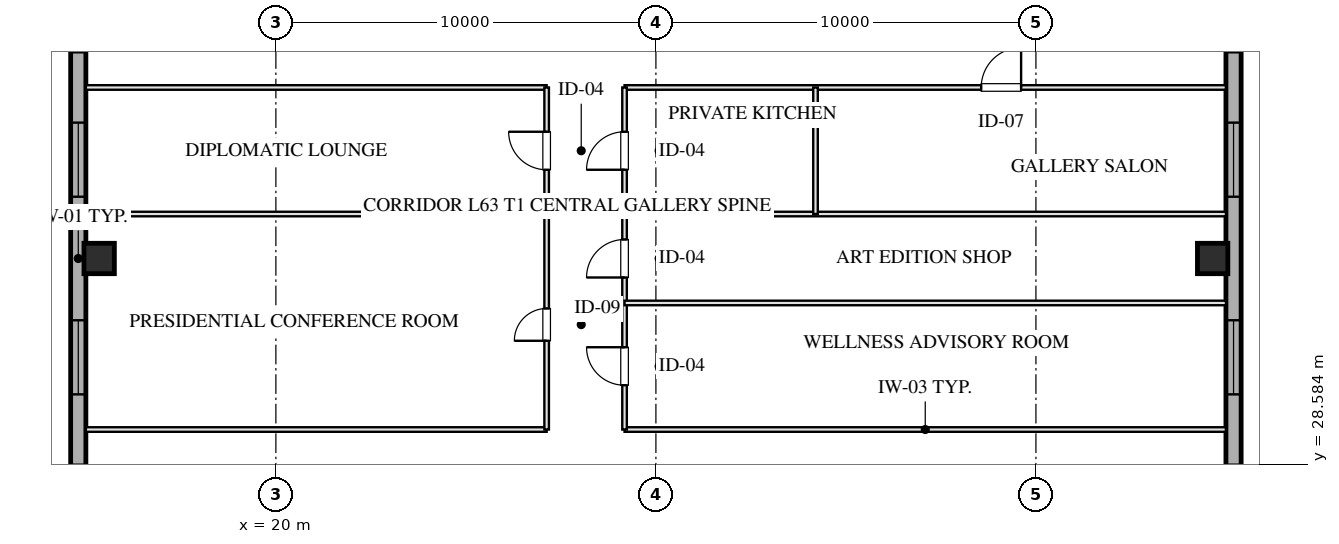
"""IFC4 building model, lengths in metres.
Left out: names, types, materials, properties, quantities, classifications, styles, units other than length and angle.
Written with IfcOpenShell. Run it as: python <this file> out.ifc"""

import sys

from ifc_helpers import new_model, si_unit, direction, frame, frame_2d, origin, origin_2d, place, context, subcontext, project, spatial, rectangle, hollow_rectangle, extrude, element, fill, save


model = new_model("IFC4")
c1 = context("Model", 3, precision=1e-05, world=origin(), true_north=direction((0.0, 1.0)))
c2 = subcontext(c1, "Body", "Model", "MODEL_VIEW")
j1 = project(units=[si_unit("LENGTHUNIT", "METRE"), si_unit("PLANEANGLEUNIT", "RADIAN")], contexts=[c1])
p1 = place(None, origin())
s1 = spatial("IfcSite", under=j1, at=p1, CompositionType="ELEMENT")
p2 = place(p1, origin())
s2 = spatial("IfcBuilding", under=s1, at=p2, CompositionType="ELEMENT")
p3 = place(p2, frame((0.0, 0.0, 234.4)))
s3 = spatial("IfcBuildingStorey", under=s2, at=p3, CompositionType="ELEMENT", Elevation=234.4)
for number, where, z_axis, x_axis in (
    (1, (15.35, 34.0, 0.0), (0.0, 0.0, 1.0), (1.0, 0.0, 0.0)),
    (2, (44.65, 34.0, 0.0), (0.0, 0.0, 1.0), (1.0, 0.0, 0.0)),
):
    element("IfcColumn", number, at=place(p3, frame(where, z_axis=z_axis, x_axis=x_axis)), inside=s3, PredefinedType="COLUMN", context=c2, shape_type="SweptSolid", body=[
        extrude(hollow_rectangle(XDim=0.8, YDim=0.8, WallThickness=0.028, at=origin_2d()), origin(), (0.0, 0.0, 1.0), 3.201),
    ])
p4 = place(p3, frame((14.8, 13.1, 0.0), z_axis=(0.0, 0.0, 1.0), x_axis=(0.0, 1.0, 0.0)))
e3 = element("IfcWall", 3, at=p4, inside=s3, PredefinedType="SOLIDWALL", context=c2, shape_type="SweptSolid", body=[
    extrude(rectangle(XDim=41.8, YDim=0.4, at=frame_2d((20.9, 0.0))), origin(), (0.0, 0.0, 1.0), 2.36),
])
p5 = place(p4, frame((13.525, 0.0, 0.75)))
e4 = element("IfcOpeningElement", 4, at=p5, cuts=e3, PredefinedType="OPENING", context=c2, shape_type="SweptSolid", body=[
    extrude(rectangle(XDim=1.95, YDim=1.21, at=frame_2d((0.975, 0.605))), frame((0.0, 0.21, 0.0), z_axis=(0.0, -1.0, 0.0), x_axis=(1.0, 0.0, 0.0)), (0.0, 0.0, 1.0), 0.42),
])
p6 = place(p4, frame((17.325, 0.0, 0.75)))
e5 = element("IfcOpeningElement", 5, at=p6, cuts=e3, PredefinedType="OPENING", context=c2, shape_type="SweptSolid", body=[
    extrude(rectangle(XDim=1.95, YDim=1.21, at=frame_2d((0.975, 0.605))), frame((0.0, 0.21, 0.0), z_axis=(0.0, -1.0, 0.0), x_axis=(1.0, 0.0, 0.0)), (0.0, 0.0, 1.0), 0.42),
])
p7 = place(p4, frame((22.525, 0.0, 0.75)))
e6 = element("IfcOpeningElement", 6, at=p7, cuts=e3, PredefinedType="OPENING", context=c2, shape_type="SweptSolid", body=[
    extrude(rectangle(XDim=1.95, YDim=1.21, at=frame_2d((0.975, 0.605))), frame((0.0, 0.21, 0.0), z_axis=(0.0, -1.0, 0.0), x_axis=(1.0, 0.0, 0.0)), (0.0, 0.0, 1.0), 0.42),
])
p8 = place(p4, frame((26.325, 0.0, 0.75)))
e7 = element("IfcOpeningElement", 7, at=p8, cuts=e3, PredefinedType="OPENING", context=c2, shape_type="SweptSolid", body=[
    extrude(rectangle(XDim=1.95, YDim=1.21, at=frame_2d((0.975, 0.605))), frame((0.0, 0.21, 0.0), z_axis=(0.0, -1.0, 0.0), x_axis=(1.0, 0.0, 0.0)), (0.0, 0.0, 1.0), 0.42),
])
p9 = place(p3, frame((45.2, 54.9, 0.0), z_axis=(0.0, 0.0, 1.0), x_axis=(0.0, -1.0, 0.0)))
e8 = element("IfcWall", 8, at=p9, inside=s3, PredefinedType="SOLIDWALL", context=c2, shape_type="SweptSolid", body=[
    extrude(rectangle(XDim=41.8, YDim=0.4, at=frame_2d((20.9, 0.0))), origin(), (0.0, 0.0, 1.0), 2.36),
])
p10 = place(p9, frame((26.325, 0.0, 0.75)))
e9 = element("IfcOpeningElement", 9, at=p10, cuts=e8, PredefinedType="OPENING", context=c2, shape_type="SweptSolid", body=[
    extrude(rectangle(XDim=1.95, YDim=1.21, at=frame_2d((0.975, 0.605))), frame((0.0, 0.21, 0.0), z_axis=(0.0, -1.0, 0.0), x_axis=(1.0, 0.0, 0.0)), (0.0, 0.0, 1.0), 0.42),
])
p11 = place(p9, frame((22.525, 0.0, 0.75)))
e10 = element("IfcOpeningElement", 10, at=p11, cuts=e8, PredefinedType="OPENING", context=c2, shape_type="SweptSolid", body=[
    extrude(rectangle(XDim=1.95, YDim=1.21, at=frame_2d((0.975, 0.605))), frame((0.0, 0.21, 0.0), z_axis=(0.0, -1.0, 0.0), x_axis=(1.0, 0.0, 0.0)), (0.0, 0.0, 1.0), 0.42),
])
p12 = place(p9, frame((17.325, 0.0, 0.75)))
e11 = element("IfcOpeningElement", 11, at=p12, cuts=e8, PredefinedType="OPENING", context=c2, shape_type="SweptSolid", body=[
    extrude(rectangle(XDim=1.95, YDim=1.21, at=frame_2d((0.975, 0.605))), frame((0.0, 0.21, 0.0), z_axis=(0.0, -1.0, 0.0), x_axis=(1.0, 0.0, 0.0)), (0.0, 0.0, 1.0), 0.42),
])
p13 = place(p9, frame((13.525, 0.0, 0.75)))
e12 = element("IfcOpeningElement", 12, at=p13, cuts=e8, PredefinedType="OPENING", context=c2, shape_type="SweptSolid", body=[
    extrude(rectangle(XDim=1.95, YDim=1.21, at=frame_2d((0.975, 0.605))), frame((0.0, 0.21, 0.0), z_axis=(0.0, -1.0, 0.0), x_axis=(1.0, 0.0, 0.0)), (0.0, 0.0, 1.0), 0.42),
])
p14 = place(p3, frame((15.0, 29.5, 0.0), z_axis=(0.0, 0.0, 1.0), x_axis=(1.0, 0.0, 0.0)))
e13 = element("IfcWall", 13, at=p14, inside=s3, PredefinedType="PARTITIONING", context=c2, shape_type="SweptSolid", body=[
    extrude(rectangle(XDim=12.125, YDim=0.12, at=frame_2d((6.062, 0.0))), origin(), (0.0, 0.0, 1.0), 2.925),
])
p15 = place(p3, frame((29.175, 29.5, 0.0), z_axis=(0.0, 0.0, 1.0), x_axis=(1.0, 0.0, 0.0)))
e14 = element("IfcWall", 14, at=p15, inside=s3, PredefinedType="PARTITIONING", context=c2, shape_type="SweptSolid", body=[
    extrude(rectangle(XDim=15.825, YDim=0.12, at=frame_2d((7.913, 0.0))), origin(), (0.0, 0.0, 1.0), 2.925),
])
p16 = place(p3, frame((15.0, 38.5, 0.0), z_axis=(0.0, 0.0, 1.0), x_axis=(1.0, 0.0, 0.0)))
e15 = element("IfcWall", 15, at=p16, inside=s3, PredefinedType="PARTITIONING", context=c2, shape_type="SweptSolid", body=[
    extrude(rectangle(XDim=12.125, YDim=0.12, at=frame_2d((6.062, 0.0))), origin(), (0.0, 0.0, 1.0), 2.925),
])
p17 = place(p3, frame((29.175, 38.5, 0.0), z_axis=(0.0, 0.0, 1.0), x_axis=(1.0, 0.0, 0.0)))
e16 = element("IfcWall", 16, at=p17, inside=s3, PredefinedType="PARTITIONING", context=c2, shape_type="SweptSolid", body=[
    extrude(rectangle(XDim=15.825, YDim=0.12, at=frame_2d((7.913, 0.0))), origin(), (0.0, 0.0, 1.0), 2.925),
])
p18 = place(p17, frame((9.385, 0.0, 0.0)))
e17 = element("IfcOpeningElement", 17, at=p18, cuts=e16, PredefinedType="OPENING", context=c2, shape_type="SweptSolid", body=[
    extrude(rectangle(XDim=1.05, YDim=2.05, at=frame_2d((0.525, 1.025))), frame((0.0, 0.07, 0.0), z_axis=(0.0, -1.0, 0.0), x_axis=(1.0, 0.0, 0.0)), (0.0, 0.0, 1.0), 0.14),
])
p19 = place(p3, frame((27.125, 29.5, 0.0), z_axis=(0.0, 0.0, 1.0), x_axis=(0.0, 1.0, 0.0)))
e18 = element("IfcWall", 18, at=p19, inside=s3, PredefinedType="PARTITIONING", context=c2, shape_type="SweptSolid", body=[
    extrude(rectangle(XDim=9.0, YDim=0.12, at=frame_2d((4.5, 0.0))), origin(), (0.0, 0.0, 1.0), 2.925),
])
p20 = place(p19, frame((2.335, 0.0, 0.0)))
e19 = element("IfcOpeningElement", 19, at=p20, cuts=e18, PredefinedType="OPENING", context=c2, shape_type="SweptSolid", body=[
    extrude(rectangle(XDim=0.85, YDim=2.05, at=frame_2d((0.425, 1.025))), frame((0.0, 0.07, 0.0), z_axis=(0.0, -1.0, 0.0), x_axis=(1.0, 0.0, 0.0)), (0.0, 0.0, 1.0), 0.14),
])
p21 = place(p19, frame((6.835, 0.0, 0.0)))
e20 = element("IfcOpeningElement", 20, at=p21, cuts=e18, PredefinedType="OPENING", context=c2, shape_type="SweptSolid", body=[
    extrude(rectangle(XDim=1.0, YDim=2.05, at=frame_2d((0.5, 1.025))), frame((0.0, 0.07, 0.0), z_axis=(0.0, -1.0, 0.0), x_axis=(1.0, 0.0, 0.0)), (0.0, 0.0, 1.0), 0.14),
])
p22 = place(p3, frame((29.175, 29.5, 0.0), z_axis=(0.0, 0.0, 1.0), x_axis=(0.0, 1.0, 0.0)))
e21 = element("IfcWall", 21, at=p22, inside=s3, PredefinedType="PARTITIONING", context=c2, shape_type="SweptSolid", body=[
    extrude(rectangle(XDim=9.0, YDim=0.12, at=frame_2d((4.5, 0.0))), origin(), (0.0, 0.0, 1.0), 2.925),
])
p23 = place(p22, frame((1.165, 0.0, 0.0)))
e22 = element("IfcOpeningElement", 22, at=p23, cuts=e21, PredefinedType="OPENING", context=c2, shape_type="SweptSolid", body=[
    extrude(rectangle(XDim=1.0, YDim=2.05, at=frame_2d((0.5, 1.025))), frame((0.0, 0.07, 0.0), z_axis=(0.0, -1.0, 0.0), x_axis=(1.0, 0.0, 0.0)), (0.0, 0.0, 1.0), 0.14),
])
p24 = place(p22, frame((4.0, 0.0, 0.0)))
e23 = element("IfcOpeningElement", 23, at=p24, cuts=e21, PredefinedType="OPENING", context=c2, shape_type="SweptSolid", body=[
    extrude(rectangle(XDim=1.0, YDim=2.05, at=frame_2d((0.5, 1.025))), frame((0.0, 0.07, 0.0), z_axis=(0.0, -1.0, 0.0), x_axis=(1.0, 0.0, 0.0)), (0.0, 0.0, 1.0), 0.14),
])
p25 = place(p22, frame((6.835, 0.0, 0.0)))
e24 = element("IfcOpeningElement", 24, at=p25, cuts=e21, PredefinedType="OPENING", context=c2, shape_type="SweptSolid", body=[
    extrude(rectangle(XDim=1.0, YDim=2.05, at=frame_2d((0.5, 1.025))), frame((0.0, 0.07, 0.0), z_axis=(0.0, -1.0, 0.0), x_axis=(1.0, 0.0, 0.0)), (0.0, 0.0, 1.0), 0.14),
])
p26 = place(p3, frame((15.0, 35.17, 0.0), z_axis=(0.0, 0.0, 1.0), x_axis=(1.0, 0.0, 0.0)))
e25 = element("IfcWall", 25, at=p26, inside=s3, PredefinedType="PARTITIONING", context=c2, shape_type="SweptSolid", body=[
    extrude(rectangle(XDim=12.125, YDim=0.12, at=frame_2d((6.062, 0.0))), origin(), (0.0, 0.0, 1.0), 2.925),
])
for number, where, z_axis, x_axis in (
    (26, (29.175, 32.83, 0.0), (0.0, 0.0, 1.0), (1.0, 0.0, 0.0)),
    (27, (29.175, 35.17, 0.0), (0.0, 0.0, 1.0), (1.0, 0.0, 0.0)),
):
    element("IfcWall", number, at=place(p3, frame(where, z_axis=z_axis, x_axis=x_axis)), inside=s3, PredefinedType="PARTITIONING", context=c2, shape_type="SweptSolid", body=[
        extrude(rectangle(XDim=15.825, YDim=0.12, at=frame_2d((7.913, 0.0))), origin(), (0.0, 0.0, 1.0), 2.925),
    ])
p27 = place(p3, frame((34.2, 35.17, 0.0), z_axis=(0.0, 0.0, 1.0), x_axis=(0.0, 1.0, 0.0)))
e28 = element("IfcWall", 28, at=p27, inside=s3, PredefinedType="PARTITIONING", context=c2, shape_type="SweptSolid", body=[
    extrude(rectangle(XDim=3.33, YDim=0.12, at=frame_2d((1.665, 0.0))), origin(), (0.0, 0.0, 1.0), 2.925),
])
p28 = place(p6, origin())
e29 = element("IfcWindow", 29, at=p28, inside=s3, PartitioningType="TRIPLE_PANEL_VERTICAL", PredefinedType="WINDOW", context=c2, shape_type="SweptSolid", body=[
    extrude(rectangle(XDim=1.95, YDim=1.21, at=frame_2d((0.975, 0.605))), frame((0.0, 0.03, 0.0), z_axis=(0.0, -1.0, 0.0), x_axis=(1.0, 0.0, 0.0)), (0.0, 0.0, 1.0), 0.06),
])
fill(e5, e29)
p29 = place(p7, origin())
e30 = element("IfcWindow", 30, at=p29, inside=s3, PartitioningType="TRIPLE_PANEL_VERTICAL", PredefinedType="WINDOW", context=c2, shape_type="SweptSolid", body=[
    extrude(rectangle(XDim=1.95, YDim=1.21, at=frame_2d((0.975, 0.605))), frame((0.0, 0.03, 0.0), z_axis=(0.0, -1.0, 0.0), x_axis=(1.0, 0.0, 0.0)), (0.0, 0.0, 1.0), 0.06),
])
fill(e6, e30)
p30 = place(p11, origin())
e31 = element("IfcWindow", 31, at=p30, inside=s3, PartitioningType="TRIPLE_PANEL_VERTICAL", PredefinedType="WINDOW", context=c2, shape_type="SweptSolid", body=[
    extrude(rectangle(XDim=1.95, YDim=1.21, at=frame_2d((0.975, 0.605))), frame((0.0, 0.03, 0.0), z_axis=(0.0, -1.0, 0.0), x_axis=(1.0, 0.0, 0.0)), (0.0, 0.0, 1.0), 0.06),
])
fill(e10, e31)
p31 = place(p12, origin())
e32 = element("IfcWindow", 32, at=p31, inside=s3, PartitioningType="TRIPLE_PANEL_VERTICAL", PredefinedType="WINDOW", context=c2, shape_type="SweptSolid", body=[
    extrude(rectangle(XDim=1.95, YDim=1.21, at=frame_2d((0.975, 0.605))), frame((0.0, 0.03, 0.0), z_axis=(0.0, -1.0, 0.0), x_axis=(1.0, 0.0, 0.0)), (0.0, 0.0, 1.0), 0.06),
])
fill(e11, e32)
p32 = place(p18, origin())
e33 = element("IfcDoor", 33, at=p32, inside=s3, OperationType="SINGLE_SWING_RIGHT", PredefinedType="DOOR", context=c2, shape_type="SweptSolid", body=[
    extrude(rectangle(XDim=1.05, YDim=2.05, at=frame_2d((0.525, 1.025))), frame((0.0, 0.025, 0.0), z_axis=(0.0, -1.0, 0.0), x_axis=(1.0, 0.0, 0.0)), (0.0, 0.0, 1.0), 0.05),
])
fill(e17, e33)
p33 = place(p20, origin())
e34 = element("IfcDoor", 34, at=p33, inside=s3, OperationType="SINGLE_SWING_LEFT", PredefinedType="DOOR", context=c2, shape_type="SweptSolid", body=[
    extrude(rectangle(XDim=0.85, YDim=2.05, at=frame_2d((0.425, 1.025))), frame((0.0, 0.025, 0.0), z_axis=(0.0, -1.0, 0.0), x_axis=(1.0, 0.0, 0.0)), (0.0, 0.0, 1.0), 0.05),
])
fill(e19, e34)
p34 = place(p21, origin())
e35 = element("IfcDoor", 35, at=p34, inside=s3, OperationType="SINGLE_SWING_RIGHT", PredefinedType="DOOR", context=c2, shape_type="SweptSolid", body=[
    extrude(rectangle(XDim=1.0, YDim=2.05, at=frame_2d((0.5, 1.025))), frame((0.0, 0.025, 0.0), z_axis=(0.0, -1.0, 0.0), x_axis=(1.0, 0.0, 0.0)), (0.0, 0.0, 1.0), 0.05),
])
fill(e20, e35)
p35 = place(p23, origin())
e36 = element("IfcDoor", 36, at=p35, inside=s3, OperationType="SINGLE_SWING_RIGHT", PredefinedType="DOOR", context=c2, shape_type="SweptSolid", body=[
    extrude(rectangle(XDim=1.0, YDim=2.05, at=frame_2d((0.5, 1.025))), frame((0.0, 0.025, 0.0), z_axis=(0.0, -1.0, 0.0), x_axis=(1.0, 0.0, 0.0)), (0.0, 0.0, 1.0), 0.05),
])
fill(e22, e36)
p36 = place(p24, origin())
e37 = element("IfcDoor", 37, at=p36, inside=s3, OperationType="SINGLE_SWING_LEFT", PredefinedType="DOOR", context=c2, shape_type="SweptSolid", body=[
    extrude(rectangle(XDim=1.0, YDim=2.05, at=frame_2d((0.5, 1.025))), frame((0.0, 0.025, 0.0), z_axis=(0.0, -1.0, 0.0), x_axis=(1.0, 0.0, 0.0)), (0.0, 0.0, 1.0), 0.05),
])
fill(e23, e37)
p37 = place(p25, origin())
e38 = element("IfcDoor", 38, at=p37, inside=s3, OperationType="SINGLE_SWING_LEFT", PredefinedType="DOOR", context=c2, shape_type="SweptSolid", body=[
    extrude(rectangle(XDim=1.0, YDim=2.05, at=frame_2d((0.5, 1.025))), frame((0.0, 0.025, 0.0), z_axis=(0.0, -1.0, 0.0), x_axis=(1.0, 0.0, 0.0)), (0.0, 0.0, 1.0), 0.05),
])
fill(e24, e38)
save(model, sys.argv[1])
